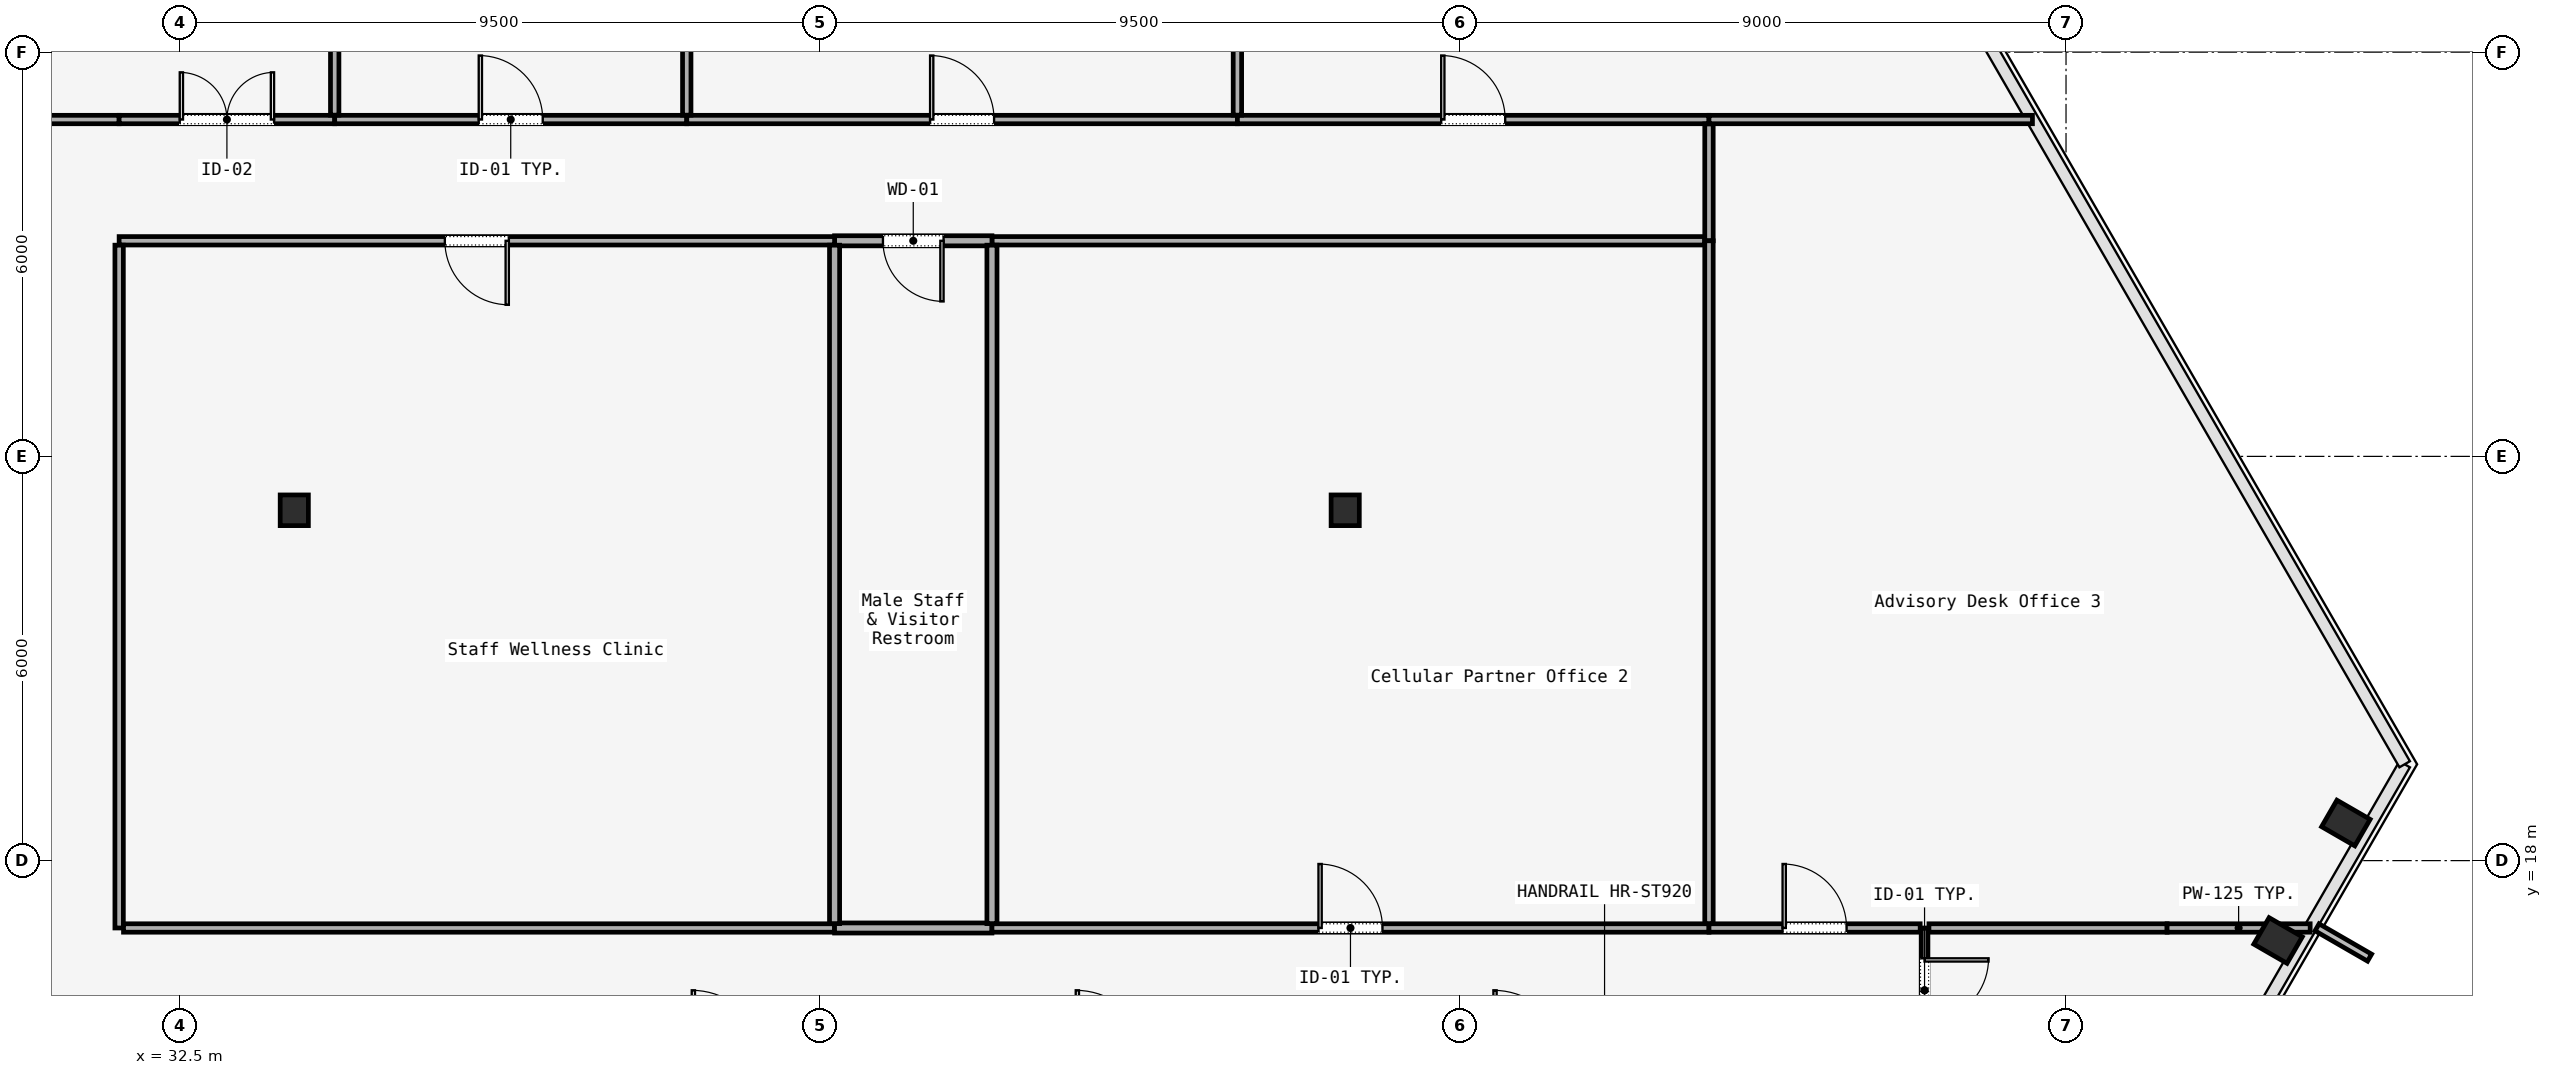
"""IFC4 building model, lengths in metres.
Left out: names, types, materials, properties, quantities, classifications, styles, units other than length and angle.
Written with IfcOpenShell. Run it as: python <this file> out.ifc"""

import sys

from ifc_helpers import new_model, si_unit, direction, frame, frame_2d, origin, origin_2d, place, context, subcontext, project, spatial, rectangle, i_section, extrude, element, fill, save


model = new_model("IFC4")
c1 = context("Model", 3, precision=1e-05, world=origin(), true_north=direction((0.0, 1.0)))
c2 = subcontext(c1, "Body", "Model", "MODEL_VIEW")
j1 = project(units=[si_unit("LENGTHUNIT", "METRE"), si_unit("PLANEANGLEUNIT", "RADIAN")], contexts=[c1])
p1 = place(None, origin())
s1 = spatial("IfcSite", under=j1, at=p1, CompositionType="ELEMENT")
p2 = place(p1, origin())
s2 = spatial("IfcBuilding", under=s1, at=p2, CompositionType="ELEMENT")
p3 = place(p2, frame((0.0, 0.0, 43.6)))
s3 = spatial("IfcBuildingStorey", under=s2, at=p3, CompositionType="ELEMENT", Elevation=43.6)
for number, where, z_axis, x_axis in (
    (1, (34.2, 23.2, 0.0), (0.0, 0.0, 1.0), (1.0, 0.0, 0.0)),
    (2, (49.8, 23.2, 0.0), (0.0, 0.0, 1.0), (1.0, 0.0, 0.0)),
):
    element("IfcColumn", number, at=place(p3, frame(where, z_axis=z_axis, x_axis=x_axis)), inside=s3, PredefinedType="COLUMN", context=c2, shape_type="SweptSolid", body=[
        extrude(i_section(OverallWidth=0.418, OverallDepth=0.456, WebThickness=0.042, FlangeThickness=0.067, FilletRadius=0.015, at=origin_2d()), origin(), (0.0, 0.0, 1.0), 3.58),
    ])
p4 = place(p3, frame((63.647, 16.814, 0.0), z_axis=(0.002377627447, -0.088311876593, 0.99609003576), x_axis=(0.476602394605, 0.875783464655, 0.076508042027)))
e3 = element("IfcColumn", 3, at=p4, inside=s3, PredefinedType="COLUMN", context=c2, shape_type="SweptSolid", body=[
    extrude(i_section(OverallWidth=0.454, OverallDepth=0.569, WebThickness=0.078, FlangeThickness=0.08, FilletRadius=0.015, at=origin_2d()), origin(), (0.0, 0.0, 1.0), 3.594),
])
p5 = place(p3, frame((64.654, 18.558, 0.0), z_axis=(-0.005427503727, -0.101765694887, 0.994793589418), x_axis=(0.545172741525, 0.833665038285, 0.088256930829)))
e4 = element("IfcColumn", 4, at=p5, inside=s3, PredefinedType="COLUMN", context=c2, shape_type="SweptSolid", body=[
    extrude(i_section(OverallWidth=0.454, OverallDepth=0.569, WebThickness=0.078, FlangeThickness=0.08, FilletRadius=0.015, at=origin_2d()), origin(), (0.0, 0.0, 1.0), 3.599),
])
p6 = place(p3, frame((58.4, 17.0, 0.0), z_axis=(0.0, 0.0, 1.0), x_axis=(0.0, -1.0, 0.0)))
e5 = element("IfcWall", 5, at=p6, inside=s3, PredefinedType="MOVABLE", context=c2, shape_type="SweptSolid", body=[
    extrude(rectangle(XDim=1.85, YDim=0.1, at=frame_2d((0.925, 0.0))), origin(), (0.0, 0.0, 1.0), 2.933),
])
p7 = place(p6, frame((0.45, 0.0, 0.0)))
e6 = element("IfcOpeningElement", 6, at=p7, cuts=e5, PredefinedType="OPENING", context=c2, shape_type="SweptSolid", body=[
    extrude(rectangle(XDim=0.95, YDim=2.2, at=frame_2d((0.475, 1.1))), frame((0.0, 0.05, 0.0), z_axis=(0.0, -1.0, 0.0), x_axis=(1.0, 0.0, 0.0)), (0.0, 0.0, 1.0), 0.1),
])
p8 = place(p3, frame((29.865, 29.0, 0.0), z_axis=(0.0, 0.0, 1.0), x_axis=(1.0, 0.0, 0.0)))
e7 = element("IfcWall", 7, at=p8, inside=s3, PredefinedType="PARTITIONING", context=c2, shape_type="SweptSolid", body=[
    extrude(rectangle(XDim=1.735, YDim=0.125, at=frame_2d((0.868, 0.0))), origin(), (0.0, 0.0, 1.0), 2.933),
])
p9 = place(p3, frame((31.6, 29.0, 0.0), z_axis=(0.0, 0.0, 1.0), x_axis=(1.0, 0.0, 0.0)))
e8 = element("IfcWall", 8, at=p9, inside=s3, PredefinedType="PARTITIONING", context=c2, shape_type="SweptSolid", body=[
    extrude(rectangle(XDim=3.2, YDim=0.125, at=frame_2d((1.6, 0.0))), origin(), (0.0, 0.0, 1.0), 2.933),
])
p10 = place(p9, frame((0.9, 0.0, 0.0)))
e9 = element("IfcOpeningElement", 9, at=p10, cuts=e8, PredefinedType="OPENING", context=c2, shape_type="SweptSolid", body=[
    extrude(rectangle(XDim=1.4, YDim=2.2, at=frame_2d((0.7, 1.1))), frame((0.0, 0.062, 0.0), z_axis=(0.0, -1.0, 0.0), x_axis=(1.0, 0.0, 0.0)), (0.0, 0.0, 1.0), 0.125),
])
p11 = place(p3, frame((34.8, 29.0, 0.0), z_axis=(0.0, 0.0, 1.0), x_axis=(1.0, 0.0, 0.0)))
e10 = element("IfcWall", 10, at=p11, inside=s3, PredefinedType="PARTITIONING", context=c2, shape_type="SweptSolid", body=[
    extrude(rectangle(XDim=5.226, YDim=0.125, at=frame_2d((2.613, 0.0))), origin(), (0.0, 0.0, 1.0), 2.933),
])
p12 = place(p11, frame((2.138, 0.0, 0.0)))
e11 = element("IfcOpeningElement", 11, at=p12, cuts=e10, PredefinedType="OPENING", context=c2, shape_type="SweptSolid", body=[
    extrude(rectangle(XDim=0.95, YDim=2.2, at=frame_2d((0.475, 1.1))), frame((0.0, 0.062, 0.0), z_axis=(0.0, -1.0, 0.0), x_axis=(1.0, 0.0, 0.0)), (0.0, 0.0, 1.0), 0.125),
])
p13 = place(p3, frame((40.026, 29.0, 0.0), z_axis=(0.0, 0.0, 1.0), x_axis=(1.0, 0.0, 0.0)))
e12 = element("IfcWall", 12, at=p13, inside=s3, PredefinedType="PARTITIONING", context=c2, shape_type="SweptSolid", body=[
    extrude(rectangle(XDim=8.174, YDim=0.125, at=frame_2d((4.087, 0.0))), origin(), (0.0, 0.0, 1.0), 2.933),
])
p14 = place(p13, frame((3.612, 0.0, 0.0)))
e13 = element("IfcOpeningElement", 13, at=p14, cuts=e12, PredefinedType="OPENING", context=c2, shape_type="SweptSolid", body=[
    extrude(rectangle(XDim=0.95, YDim=2.2, at=frame_2d((0.475, 1.1))), frame((0.0, 0.062, 0.0), z_axis=(0.0, -1.0, 0.0), x_axis=(1.0, 0.0, 0.0)), (0.0, 0.0, 1.0), 0.125),
])
p15 = place(p3, frame((48.2, 29.0, 0.0), z_axis=(0.0, 0.0, 1.0), x_axis=(1.0, 0.0, 0.0)))
e14 = element("IfcWall", 14, at=p15, inside=s3, PredefinedType="PARTITIONING", context=c2, shape_type="SweptSolid", body=[
    extrude(rectangle(XDim=7.0, YDim=0.125, at=frame_2d((3.5, 0.0))), origin(), (0.0, 0.0, 1.0), 2.933),
])
p16 = place(p15, frame((3.025, 0.0, 0.0)))
e15 = element("IfcOpeningElement", 15, at=p16, cuts=e14, PredefinedType="OPENING", context=c2, shape_type="SweptSolid", body=[
    extrude(rectangle(XDim=0.95, YDim=2.2, at=frame_2d((0.475, 1.1))), frame((0.0, 0.062, 0.0), z_axis=(0.0, -1.0, 0.0), x_axis=(1.0, 0.0, 0.0)), (0.0, 0.0, 1.0), 0.125),
])
p17 = place(p3, frame((55.2, 28.935, 0.0), z_axis=(0.0, 0.0, 1.0), x_axis=(0.0, -1.0, 0.0)))
e16 = element("IfcWall", 16, at=p17, inside=s3, PredefinedType="PARTITIONING", context=c2, shape_type="SweptSolid", body=[
    extrude(rectangle(XDim=1.735, YDim=0.125, at=frame_2d((0.868, 0.0))), origin(), (0.0, 0.0, 1.0), 2.933),
])
p18 = place(p3, frame((55.135, 27.2, 0.0), z_axis=(0.0, 0.0, 1.0), x_axis=(-1.0, 0.0, 0.0)))
e17 = element("IfcWall", 17, at=p18, inside=s3, PredefinedType="PARTITIONING", context=c2, shape_type="SweptSolid", body=[
    extrude(rectangle(XDim=10.579, YDim=0.125, at=frame_2d((5.289, 0.0))), origin(), (0.0, 0.0, 1.0), 2.933),
])
p19 = place(p3, frame((44.556, 27.2, 0.0), z_axis=(0.0, 0.0, 1.0), x_axis=(-1.0, 0.0, 0.0)))
e18 = element("IfcWall", 18, at=p19, inside=s3, PredefinedType="PARTITIONING", context=c2, shape_type="SweptSolid", body=[
    extrude(rectangle(XDim=2.336, YDim=0.15, at=frame_2d((1.168, 0.0))), origin(), (0.0, 0.0, 1.0), 2.933),
])
p20 = place(p19, frame((0.718, 0.0, 0.0)))
e19 = element("IfcOpeningElement", 19, at=p20, cuts=e18, PredefinedType="OPENING", context=c2, shape_type="SweptSolid", body=[
    extrude(rectangle(XDim=0.9, YDim=2.15, at=frame_2d((0.45, 1.075))), frame((0.0, 0.075, 0.0), z_axis=(0.0, -1.0, 0.0), x_axis=(1.0, 0.0, 0.0)), (0.0, 0.0, 1.0), 0.15),
])
p21 = place(p3, frame((42.22, 27.2, 0.0), z_axis=(0.0, 0.0, 1.0), x_axis=(-1.0, 0.0, 0.0)))
e20 = element("IfcWall", 20, at=p21, inside=s3, PredefinedType="PARTITIONING", context=c2, shape_type="SweptSolid", body=[
    extrude(rectangle(XDim=10.62, YDim=0.125, at=frame_2d((5.31, 0.0))), origin(), (0.0, 0.0, 1.0), 2.933),
])
p22 = place(p21, frame((4.835, 0.0, 0.0)))
e21 = element("IfcOpeningElement", 21, at=p22, cuts=e20, PredefinedType="OPENING", context=c2, shape_type="SweptSolid", body=[
    extrude(rectangle(XDim=0.95, YDim=2.2, at=frame_2d((0.475, 1.1))), frame((0.0, 0.062, 0.0), z_axis=(0.0, -1.0, 0.0), x_axis=(1.0, 0.0, 0.0)), (0.0, 0.0, 1.0), 0.125),
])
p23 = place(p3, frame((31.6, 27.135, 0.0), z_axis=(0.0, 0.0, 1.0), x_axis=(0.0, -1.0, 0.0)))
e22 = element("IfcWall", 22, at=p23, inside=s3, PredefinedType="PARTITIONING", context=c2, shape_type="SweptSolid", body=[
    extrude(rectangle(XDim=10.135, YDim=0.125, at=frame_2d((5.067, 0.0))), origin(), (0.0, 0.0, 1.0), 2.933),
])
p24 = place(p3, frame((31.665, 17.0, 0.0), z_axis=(0.0, 0.0, 1.0), x_axis=(1.0, 0.0, 0.0)))
e23 = element("IfcWall", 23, at=p24, inside=s3, PredefinedType="PARTITIONING", context=c2, shape_type="SweptSolid", body=[
    extrude(rectangle(XDim=10.555, YDim=0.125, at=frame_2d((5.277, 0.0))), origin(), (0.0, 0.0, 1.0), 2.933),
])
p25 = place(p3, frame((42.22, 17.0, 0.0), z_axis=(0.0, 0.0, 1.0), x_axis=(1.0, 0.0, 0.0)))
e24 = element("IfcWall", 24, at=p25, inside=s3, PredefinedType="PARTITIONING", context=c2, shape_type="SweptSolid", body=[
    extrude(rectangle(XDim=2.336, YDim=0.15, at=frame_2d((1.168, 0.0))), origin(), (0.0, 0.0, 1.0), 2.933),
])
p26 = place(p3, frame((44.556, 17.0, 0.0), z_axis=(0.0, 0.0, 1.0), x_axis=(1.0, 0.0, 0.0)))
e25 = element("IfcWall", 25, at=p26, inside=s3, PredefinedType="PARTITIONING", context=c2, shape_type="SweptSolid", body=[
    extrude(rectangle(XDim=10.644, YDim=0.125, at=frame_2d((5.322, 0.0))), origin(), (0.0, 0.0, 1.0), 2.933),
])
p27 = place(p26, frame((4.847, 0.0, 0.0)))
e26 = element("IfcOpeningElement", 26, at=p27, cuts=e25, PredefinedType="OPENING", context=c2, shape_type="SweptSolid", body=[
    extrude(rectangle(XDim=0.95, YDim=2.2, at=frame_2d((0.475, 1.1))), frame((0.0, 0.062, 0.0), z_axis=(0.0, -1.0, 0.0), x_axis=(1.0, 0.0, 0.0)), (0.0, 0.0, 1.0), 0.125),
])
p28 = place(p3, frame((55.2, 17.0, 0.0), z_axis=(0.0, 0.0, 1.0), x_axis=(1.0, 0.0, 0.0)))
e27 = element("IfcWall", 27, at=p28, inside=s3, PredefinedType="PARTITIONING", context=c2, shape_type="SweptSolid", body=[
    extrude(rectangle(XDim=3.135, YDim=0.125, at=frame_2d((1.567, 0.0))), origin(), (0.0, 0.0, 1.0), 2.933),
])
p29 = place(p28, frame((1.093, 0.0, 0.0)))
e28 = element("IfcOpeningElement", 28, at=p29, cuts=e27, PredefinedType="OPENING", context=c2, shape_type="SweptSolid", body=[
    extrude(rectangle(XDim=0.95, YDim=2.2, at=frame_2d((0.475, 1.1))), frame((0.0, 0.062, 0.0), z_axis=(0.0, -1.0, 0.0), x_axis=(1.0, 0.0, 0.0)), (0.0, 0.0, 1.0), 0.125),
])
p30 = place(p3, frame((58.465, 17.0, 0.0), z_axis=(0.0, 0.0, 1.0), x_axis=(1.0, 0.0, 0.0)))
e29 = element("IfcWall", 29, at=p30, inside=s3, PredefinedType="PARTITIONING", context=c2, shape_type="SweptSolid", body=[
    extrude(rectangle(XDim=3.535, YDim=0.125, at=frame_2d((1.768, 0.0))), origin(), (0.0, 0.0, 1.0), 2.933),
])
p31 = place(p3, frame((62.0, 17.0, 0.0), z_axis=(0.0, 0.0, 1.0), x_axis=(1.0, 0.0, 0.0)))
e30 = element("IfcWall", 30, at=p31, inside=s3, PredefinedType="PARTITIONING", context=c2, shape_type="SweptSolid", body=[
    extrude(rectangle(XDim=2.124, YDim=0.125, at=frame_2d((1.062, 0.0))), origin(), (0.0, 0.0, 1.0), 2.933),
])
for number, where, z_axis, x_axis in (
    (31, (42.22, 27.135, 0.0), (0.0, 0.0, 1.0), (0.0, -1.0, 0.0)),
    (32, (44.556, 27.135, 0.0), (0.0, 0.0, 1.0), (0.0, -1.0, 0.0)),
):
    element("IfcWall", number, at=place(p3, frame(where, z_axis=z_axis, x_axis=x_axis)), inside=s3, PredefinedType="PARTITIONING", context=c2, shape_type="SweptSolid", body=[
        extrude(rectangle(XDim=10.07, YDim=0.15, at=frame_2d((5.035, 0.0))), origin(), (0.0, 0.0, 1.0), 2.933),
    ])
p32 = place(p3, frame((55.2, 27.2, 0.0), z_axis=(0.0, 0.0, 1.0), x_axis=(0.0, -1.0, 0.0)))
e33 = element("IfcWall", 33, at=p32, inside=s3, PredefinedType="PARTITIONING", context=c2, shape_type="SweptSolid", body=[
    extrude(rectangle(XDim=10.135, YDim=0.125, at=frame_2d((5.067, 0.0))), origin(), (0.0, 0.0, 1.0), 2.933),
])
p33 = place(p3, frame((55.2, 29.0, 0.0), z_axis=(0.0, 0.0, 1.0), x_axis=(1.0, 0.0, 0.0)))
e34 = element("IfcWall", 34, at=p33, inside=s3, PredefinedType="PARTITIONING", context=c2, shape_type="SweptSolid", body=[
    extrude(rectangle(XDim=4.802, YDim=0.125, at=frame_2d((2.401, 0.0))), origin(), (0.0, 0.0, 1.0), 2.933),
])
for number, where, z_axis, x_axis in (
    (35, (34.8, 45.91, 0.0), (0.0, 0.0, 1.0), (0.0, -1.0, 0.0)),
    (36, (48.2, 29.065, 0.0), (0.0, 0.0, 1.0), (0.0, 1.0, 0.0)),
    (37, (40.026, 29.065, 0.0), (0.0, 0.0, 1.0), (0.0, 1.0, 0.0)),
):
    element("IfcWall", number, at=place(p3, frame(where, z_axis=z_axis, x_axis=x_axis)), inside=s3, PredefinedType="PARTITIONING", context=c2, shape_type="SweptSolid", body=[
        extrude(rectangle(XDim=16.845, YDim=0.125, at=frame_2d((8.422, 0.0))), origin(), (0.0, 0.0, 1.0), 2.933),
    ])
p34 = place(p7, origin())
e38 = element("IfcDoor", 38, at=p34, inside=s3, OperationType="SINGLE_SWING_RIGHT", PredefinedType="DOOR", context=c2, shape_type="SweptSolid", body=[
    extrude(rectangle(XDim=0.95, YDim=2.2, at=frame_2d((0.475, 1.1))), frame((0.0, 0.025, 0.0), z_axis=(0.0, -1.0, 0.0), x_axis=(1.0, 0.0, 0.0)), (0.0, 0.0, 1.0), 0.05),
])
fill(e6, e38)
p35 = place(p22, origin())
e39 = element("IfcDoor", 39, at=p35, inside=s3, OperationType="SINGLE_SWING_RIGHT", PredefinedType="DOOR", context=c2, shape_type="SweptSolid", body=[
    extrude(rectangle(XDim=0.95, YDim=2.2, at=frame_2d((0.475, 1.1))), frame((0.0, 0.025, 0.0), z_axis=(0.0, -1.0, 0.0), x_axis=(1.0, 0.0, 0.0)), (0.0, 0.0, 1.0), 0.05),
])
fill(e21, e39)
p36 = place(p20, origin())
e40 = element("IfcDoor", 40, at=p36, inside=s3, OperationType="SINGLE_SWING_LEFT", PredefinedType="DOOR", context=c2, shape_type="SweptSolid", body=[
    extrude(rectangle(XDim=0.9, YDim=2.15, at=frame_2d((0.45, 1.075))), frame((0.0, 0.025, 0.0), z_axis=(0.0, -1.0, 0.0), x_axis=(1.0, 0.0, 0.0)), (0.0, 0.0, 1.0), 0.05),
])
fill(e19, e40)
p37 = place(p27, origin())
e41 = element("IfcDoor", 41, at=p37, inside=s3, OperationType="SINGLE_SWING_RIGHT", PredefinedType="DOOR", context=c2, shape_type="SweptSolid", body=[
    extrude(rectangle(XDim=0.95, YDim=2.2, at=frame_2d((0.475, 1.1))), frame((0.0, 0.025, 0.0), z_axis=(0.0, -1.0, 0.0), x_axis=(1.0, 0.0, 0.0)), (0.0, 0.0, 1.0), 0.05),
])
fill(e26, e41)
p38 = place(p29, origin())
e42 = element("IfcDoor", 42, at=p38, inside=s3, OperationType="SINGLE_SWING_LEFT", PredefinedType="DOOR", context=c2, shape_type="SweptSolid", body=[
    extrude(rectangle(XDim=0.95, YDim=2.2, at=frame_2d((0.475, 1.1))), frame((0.0, 0.025, 0.0), z_axis=(0.0, -1.0, 0.0), x_axis=(1.0, 0.0, 0.0)), (0.0, 0.0, 1.0), 0.05),
])
fill(e28, e42)
p39 = place(p10, origin())
e43 = element("IfcDoor", 43, at=p39, inside=s3, OperationType="SINGLE_SWING_LEFT", PredefinedType="DOOR", context=c2, shape_type="SweptSolid", body=[
    extrude(rectangle(XDim=1.4, YDim=2.2, at=frame_2d((0.7, 1.1))), frame((0.0, 0.025, 0.0), z_axis=(0.0, -1.0, 0.0), x_axis=(1.0, 0.0, 0.0)), (0.0, 0.0, 1.0), 0.05),
])
fill(e9, e43)
p40 = place(p16, origin())
e44 = element("IfcDoor", 44, at=p40, inside=s3, OperationType="SINGLE_SWING_RIGHT", PredefinedType="DOOR", context=c2, shape_type="SweptSolid", body=[
    extrude(rectangle(XDim=0.95, YDim=2.2, at=frame_2d((0.475, 1.1))), frame((0.0, 0.025, 0.0), z_axis=(0.0, -1.0, 0.0), x_axis=(1.0, 0.0, 0.0)), (0.0, 0.0, 1.0), 0.05),
])
fill(e15, e44)
p41 = place(p14, origin())
e45 = element("IfcDoor", 45, at=p41, inside=s3, OperationType="SINGLE_SWING_LEFT", PredefinedType="DOOR", context=c2, shape_type="SweptSolid", body=[
    extrude(rectangle(XDim=0.95, YDim=2.2, at=frame_2d((0.475, 1.1))), frame((0.0, 0.025, 0.0), z_axis=(0.0, -1.0, 0.0), x_axis=(1.0, 0.0, 0.0)), (0.0, 0.0, 1.0), 0.05),
])
fill(e13, e45)
p42 = place(p12, origin())
e46 = element("IfcDoor", 46, at=p42, inside=s3, OperationType="SINGLE_SWING_RIGHT", PredefinedType="DOOR", context=c2, shape_type="SweptSolid", body=[
    extrude(rectangle(XDim=0.95, YDim=2.2, at=frame_2d((0.475, 1.1))), frame((0.0, 0.025, 0.0), z_axis=(0.0, -1.0, 0.0), x_axis=(1.0, 0.0, 0.0)), (0.0, 0.0, 1.0), 0.05),
])
fill(e11, e46)
save(model, sys.argv[1])
